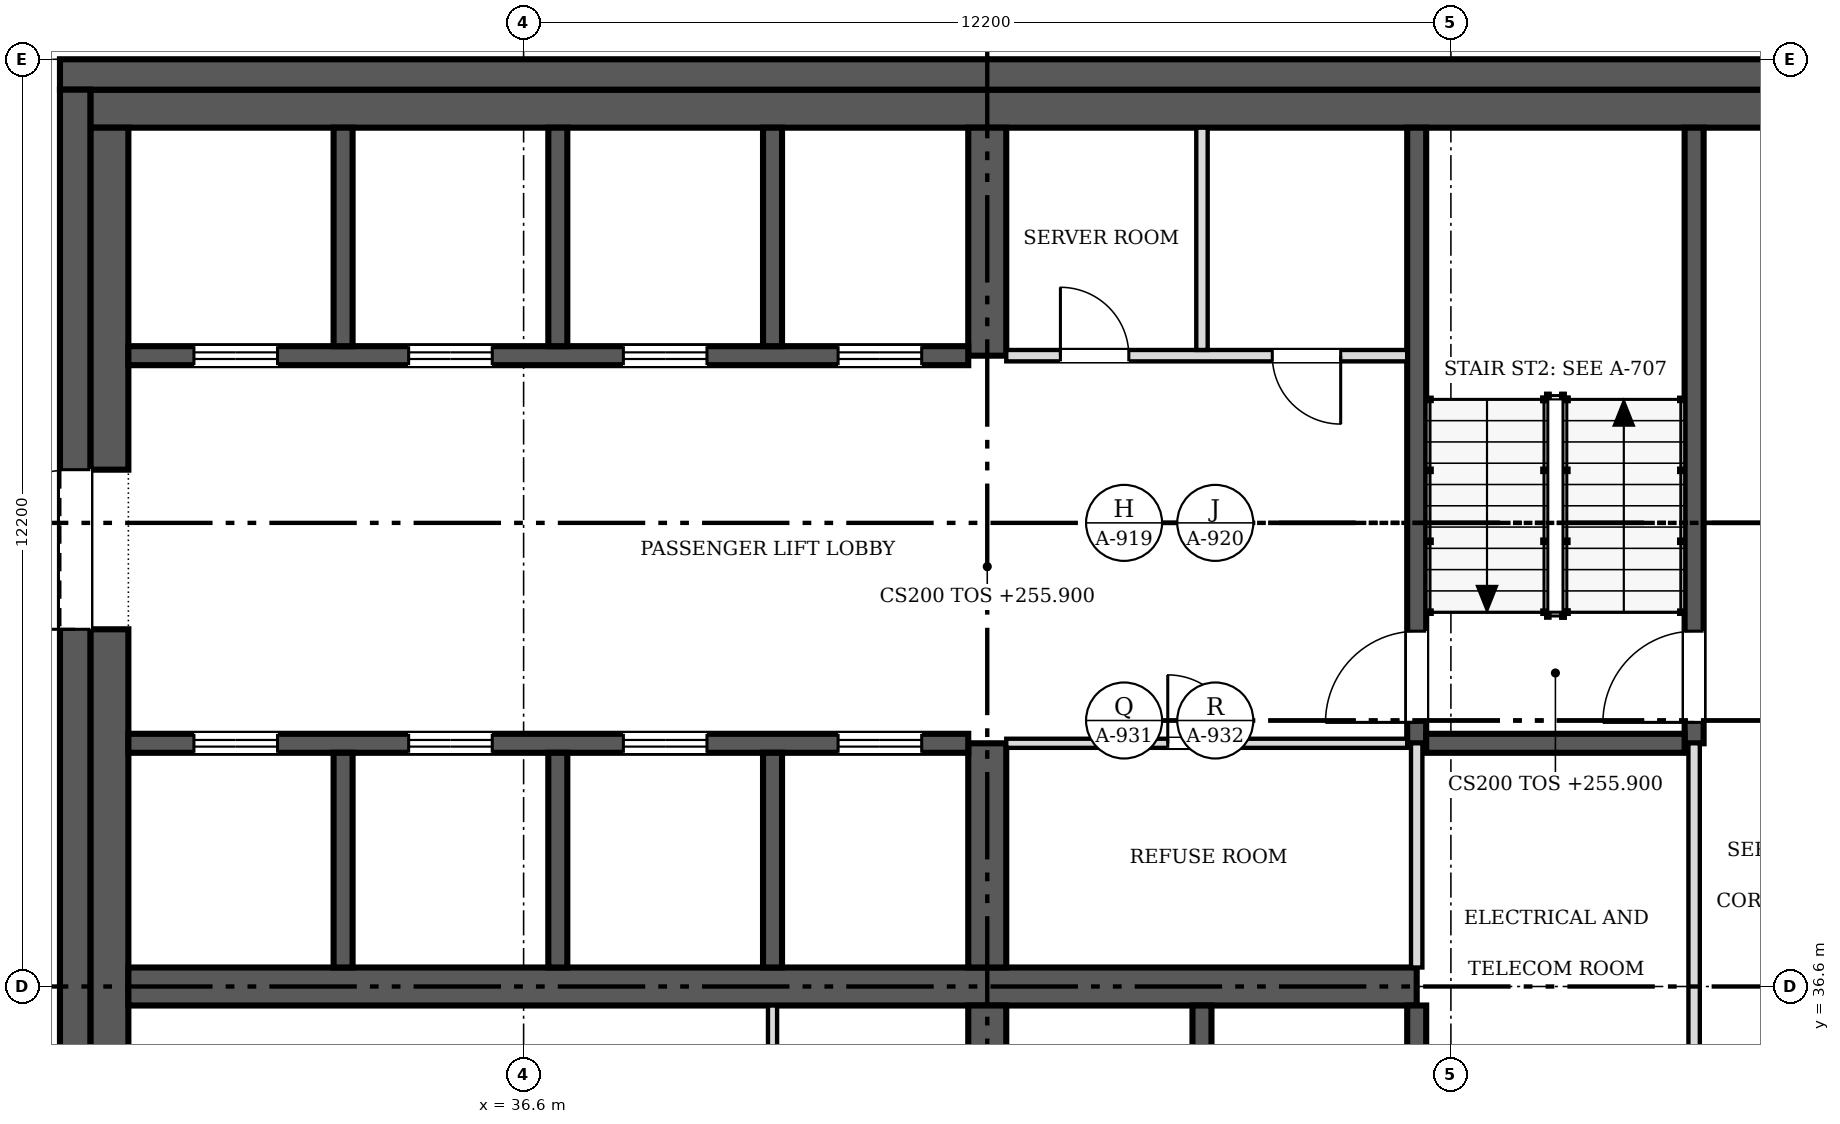
"""IFC4 building model, lengths in metres.
Left out: names, types, materials, properties, quantities, classifications, styles, units other than length and angle.
Written with IfcOpenShell. Run it as: python <this file> out.ifc"""

import sys

from ifc_helpers import new_model, si_unit, direction, frame, frame_2d, origin, place, context, subcontext, project, spatial, rectangle, extrude, source, transform, mapped, element, fill, save


model = new_model("IFC4")
c1 = context("Model", 3, precision=1e-05, world=origin(), true_north=direction((0.0, 1.0)))
c2 = subcontext(c1, "Body", "Model", "MODEL_VIEW")
j1 = project(units=[si_unit("LENGTHUNIT", "METRE"), si_unit("PLANEANGLEUNIT", "RADIAN")], contexts=[c1])
p1 = place(None, origin())
s1 = spatial("IfcSite", under=j1, at=p1, CompositionType="ELEMENT")
p2 = place(p1, origin())
s2 = spatial("IfcBuilding", under=s1, at=p2, CompositionType="ELEMENT")
p3 = place(p2, frame((0.0, 0.0, 255.9)))
s3 = spatial("IfcBuildingStorey", under=s2, at=p3, CompositionType="ELEMENT", Elevation=255.9)
p4 = place(p3, frame((30.7, 24.8, 0.0), z_axis=(0.0, 0.0, 1.0), x_axis=(0.0, 1.0, 0.0)))
e1 = element("IfcWall", 1, at=p4, inside=s3, PredefinedType="SHEAR", context=c2, shape_type="SweptSolid", body=[
    extrude(rectangle(XDim=23.6, YDim=0.4, at=frame_2d((11.8, 0.0))), origin(), (0.0, 0.0, 1.0), 3.8),
])
m1 = source(origin(), c2, "Body", "SweptSolid", [
    extrude(rectangle(XDim=2.1, YDim=2.4, at=frame_2d((1.05, 1.2))), frame((0.0, 0.21, 0.0), z_axis=(0.0, -1.0, 0.0), x_axis=(1.0, 0.0, 0.0)), (0.0, 0.0, 1.0), 0.42),
])
p5 = place(p4, frame((5.0, 0.0, 0.0)))
e2 = element("IfcOpeningElement", 2, at=p5, cuts=e1, PredefinedType="OPENING", context=c2, shape_type="MappedRepresentation", body=[
    mapped(m1, transform((0.0, 0.0, 0.0), scale=1.0)),
])
p6 = place(p4, frame((16.5, 0.0, 0.0)))
e3 = element("IfcOpeningElement", 3, at=p6, cuts=e1, PredefinedType="OPENING", context=c2, shape_type="MappedRepresentation", body=[
    mapped(m1, transform((0.0, 0.0, 0.0), scale=1.0)),
])
p7 = place(p3, frame((30.5, 48.6, 0.0), z_axis=(0.0, 0.0, 1.0), x_axis=(1.0, 0.0, 0.0)))
e4 = element("IfcWall", 4, at=p7, inside=s3, PredefinedType="SHEAR", context=c2, shape_type="SweptSolid", body=[
    extrude(rectangle(XDim=24.4, YDim=0.4, at=frame_2d((12.2, 0.0))), origin(), (0.0, 0.0, 1.0), 3.8),
])
p8 = place(p3, frame((30.9, 48.15, 0.0), z_axis=(0.0, 0.0, 1.0), x_axis=(1.0, 0.0, 0.0)))
e5 = element("IfcWall", 5, at=p8, inside=s3, PredefinedType="SOLIDWALL", context=c2, shape_type="SweptSolid", body=[
    extrude(rectangle(XDim=23.6, YDim=0.5, at=frame_2d((11.8, 0.0))), origin(), (0.0, 0.0, 1.0), 3.8),
])
p9 = place(p3, frame((31.15, 31.9, 0.0), z_axis=(0.0, 0.0, 1.0), x_axis=(0.0, 1.0, 0.0)))
e6 = element("IfcWall", 6, at=p9, inside=s3, PredefinedType="SOLIDWALL", context=c2, shape_type="SweptSolid", body=[
    extrude(rectangle(XDim=9.4, YDim=0.5, at=frame_2d((4.7, 0.0))), origin(), (0.0, 0.0, 1.0), 3.8),
])
p10 = place(p3, frame((31.15, 43.4, 0.0), z_axis=(0.0, 0.0, 1.0), x_axis=(0.0, 1.0, 0.0)))
e7 = element("IfcWall", 7, at=p10, inside=s3, PredefinedType="SOLIDWALL", context=c2, shape_type="SweptSolid", body=[
    extrude(rectangle(XDim=4.5, YDim=0.5, at=frame_2d((2.25, 0.0))), origin(), (0.0, 0.0, 1.0), 3.8),
])
p11 = place(p3, frame((31.4, 36.6, 0.0), z_axis=(0.0, 0.0, 1.0), x_axis=(1.0, 0.0, 0.0)))
e8 = element("IfcWall", 8, at=p11, inside=s3, PredefinedType="SHEAR", context=c2, shape_type="SweptSolid", body=[
    extrude(rectangle(XDim=16.95, YDim=0.5, at=frame_2d((8.475, 0.0))), origin(), (0.0, 0.0, 1.0), 3.8),
])
p12 = place(p3, frame((42.7, 36.35, 0.0), z_axis=(0.0, 0.0, 1.0), x_axis=(0.0, -1.0, 0.0)))
e9 = element("IfcWall", 9, at=p12, inside=s3, PredefinedType="SHEAR", context=c2, shape_type="SweptSolid", body=[
    extrude(rectangle(XDim=11.05, YDim=0.5, at=frame_2d((5.525, 0.0))), origin(), (0.0, 0.0, 1.0), 3.8),
])
m2 = source(origin(), c2, "Body", "SweptSolid", [
    extrude(rectangle(XDim=0.9, YDim=2.1, at=frame_2d((0.45, 1.05))), frame((0.0, 0.26, 0.0), z_axis=(0.0, -1.0, 0.0), x_axis=(1.0, 0.0, 0.0)), (0.0, 0.0, 1.0), 0.52),
])
p13 = place(p12, frame((6.5, 0.0, 0.0)))
e10 = element("IfcOpeningElement", 10, at=p13, cuts=e9, PredefinedType="OPENING", context=c2, shape_type="MappedRepresentation", body=[
    mapped(m2, transform((0.0, 0.0, 0.0), scale=1.0)),
])
m3 = source(origin(), c2, "Body", "SweptSolid", [
    extrude(rectangle(XDim=1.1, YDim=2.1, at=frame_2d((0.55, 1.05))), frame((0.0, 0.26, 0.0), z_axis=(0.0, -1.0, 0.0), x_axis=(1.0, 0.0, 0.0)), (0.0, 0.0, 1.0), 0.52),
])
p14 = place(p12, frame((3.8, 0.0, 0.0)))
e11 = element("IfcOpeningElement", 11, at=p14, cuts=e9, PredefinedType="OPENING", context=c2, shape_type="MappedRepresentation", body=[
    mapped(m3, transform((0.0, 0.0, 0.0), scale=1.0)),
])
p15 = place(p3, frame((42.7, 36.85, 0.0), z_axis=(0.0, 0.0, 1.0), x_axis=(0.0, 1.0, 0.0)))
e12 = element("IfcWall", 12, at=p15, inside=s3, PredefinedType="SHEAR", context=c2, shape_type="SweptSolid", body=[
    extrude(rectangle(XDim=2.95, YDim=0.5, at=frame_2d((1.475, 0.0))), origin(), (0.0, 0.0, 1.0), 3.8),
])
p16 = place(p3, frame((42.7, 44.9, 0.0), z_axis=(0.0, 0.0, 1.0), x_axis=(0.0, 1.0, 0.0)))
e13 = element("IfcWall", 13, at=p16, inside=s3, PredefinedType="SHEAR", context=c2, shape_type="SweptSolid", body=[
    extrude(rectangle(XDim=3.0, YDim=0.5, at=frame_2d((1.5, 0.0))), origin(), (0.0, 0.0, 1.0), 3.8),
])
p17 = place(p3, frame((31.4, 39.8, 0.0), z_axis=(0.0, 0.0, 1.0), x_axis=(1.0, 0.0, 0.0)))
e14 = element("IfcWall", 14, at=p17, inside=s3, PredefinedType="SOLIDWALL", context=c2, shape_type="SweptSolid", body=[
    extrude(rectangle(XDim=11.05, YDim=0.25, at=frame_2d((5.525, 0.0))), origin(), (0.0, 0.0, 1.0), 3.8),
])
m4 = source(origin(), c2, "Body", "SweptSolid", [
    extrude(rectangle(XDim=1.1, YDim=2.1, at=frame_2d((0.55, 1.05))), frame((0.0, 0.135, 0.0), z_axis=(0.0, -1.0, 0.0), x_axis=(1.0, 0.0, 0.0)), (0.0, 0.0, 1.0), 0.27),
])
p18 = place(p17, frame((0.863, 0.0, 0.0)))
e15 = element("IfcOpeningElement", 15, at=p18, cuts=e14, PredefinedType="OPENING", context=c2, shape_type="MappedRepresentation", body=[
    mapped(m4, transform((0.0, 0.0, 0.0), scale=1.0)),
])
p19 = place(p17, frame((3.688, 0.0, 0.0)))
e16 = element("IfcOpeningElement", 16, at=p19, cuts=e14, PredefinedType="OPENING", context=c2, shape_type="MappedRepresentation", body=[
    mapped(m4, transform((0.0, 0.0, 0.0), scale=1.0)),
])
p20 = place(p17, frame((6.512, 0.0, 0.0)))
e17 = element("IfcOpeningElement", 17, at=p20, cuts=e14, PredefinedType="OPENING", context=c2, shape_type="MappedRepresentation", body=[
    mapped(m4, transform((0.0, 0.0, 0.0), scale=1.0)),
])
p21 = place(p17, frame((9.337, 0.0, 0.0)))
e18 = element("IfcOpeningElement", 18, at=p21, cuts=e14, PredefinedType="OPENING", context=c2, shape_type="MappedRepresentation", body=[
    mapped(m4, transform((0.0, 0.0, 0.0), scale=1.0)),
])
p22 = place(p3, frame((42.45, 44.9, 0.0), z_axis=(0.0, 0.0, 1.0), x_axis=(-1.0, 0.0, 0.0)))
e19 = element("IfcWall", 19, at=p22, inside=s3, PredefinedType="SOLIDWALL", context=c2, shape_type="SweptSolid", body=[
    extrude(rectangle(XDim=11.05, YDim=0.25, at=frame_2d((5.525, 0.0))), origin(), (0.0, 0.0, 1.0), 3.8),
])
p23 = place(p22, frame((9.087, 0.0, 0.0)))
e20 = element("IfcOpeningElement", 20, at=p23, cuts=e19, PredefinedType="OPENING", context=c2, shape_type="MappedRepresentation", body=[
    mapped(m4, transform((0.0, 0.0, 0.0), scale=1.0)),
])
p24 = place(p22, frame((6.262, 0.0, 0.0)))
e21 = element("IfcOpeningElement", 21, at=p24, cuts=e19, PredefinedType="OPENING", context=c2, shape_type="MappedRepresentation", body=[
    mapped(m4, transform((0.0, 0.0, 0.0), scale=1.0)),
])
p25 = place(p22, frame((3.438, 0.0, 0.0)))
e22 = element("IfcOpeningElement", 22, at=p25, cuts=e19, PredefinedType="OPENING", context=c2, shape_type="MappedRepresentation", body=[
    mapped(m4, transform((0.0, 0.0, 0.0), scale=1.0)),
])
p26 = place(p22, frame((0.613, 0.0, 0.0)))
e23 = element("IfcOpeningElement", 23, at=p26, cuts=e19, PredefinedType="OPENING", context=c2, shape_type="MappedRepresentation", body=[
    mapped(m4, transform((0.0, 0.0, 0.0), scale=1.0)),
])
p27 = place(p3, frame((48.35, 36.35, 0.0), z_axis=(0.0, 0.0, 1.0), x_axis=(0.0, -1.0, 0.0)))
e24 = element("IfcWall", 24, at=p27, inside=s3, PredefinedType="SOLIDWALL", context=c2, shape_type="SweptSolid", body=[
    extrude(rectangle(XDim=11.05, YDim=0.25, at=frame_2d((5.525, 0.0))), origin(), (0.0, 0.0, 1.0), 3.8),
])
m5 = source(origin(), c2, "Body", "SweptSolid", [
    extrude(rectangle(XDim=1.2, YDim=2.1, at=frame_2d((0.6, 1.05))), frame((0.0, 0.135, 0.0), z_axis=(0.0, -1.0, 0.0), x_axis=(1.0, 0.0, 0.0)), (0.0, 0.0, 1.0), 0.27),
])
p28 = place(p27, frame((3.225, 0.0, 0.0)))
e25 = element("IfcOpeningElement", 25, at=p28, cuts=e24, PredefinedType="OPENING", context=c2, shape_type="MappedRepresentation", body=[
    mapped(m5, transform((0.0, 0.0, 0.0), scale=1.0)),
])
p29 = place(p3, frame((48.35, 47.9, 0.0), z_axis=(0.0, 0.0, 1.0), x_axis=(0.0, -1.0, 0.0)))
e26 = element("IfcWall", 26, at=p29, inside=s3, PredefinedType="SOLIDWALL", context=c2, shape_type="SweptSolid", body=[
    extrude(rectangle(XDim=8.1, YDim=0.25, at=frame_2d((4.05, 0.0))), origin(), (0.0, 0.0, 1.0), 3.8),
])
p30 = place(p29, frame((6.625, 0.0, 0.0)))
e27 = element("IfcOpeningElement", 27, at=p30, cuts=e26, PredefinedType="OPENING", context=c2, shape_type="MappedRepresentation", body=[
    mapped(m5, transform((0.0, 0.0, 0.0), scale=1.0)),
])
p31 = place(p3, frame((52.0, 39.8, 0.0), z_axis=(0.0, 0.0, 1.0), x_axis=(0.0, 1.0, 0.0)))
e28 = element("IfcWall", 28, at=p31, inside=s3, PredefinedType="SOLIDWALL", context=c2, shape_type="SweptSolid", body=[
    extrude(rectangle(XDim=8.1, YDim=0.25, at=frame_2d((4.05, 0.0))), origin(), (0.0, 0.0, 1.0), 3.8),
])
p32 = place(p31, frame((0.275, 0.0, 0.0)))
e29 = element("IfcOpeningElement", 29, at=p32, cuts=e28, PredefinedType="OPENING", context=c2, shape_type="MappedRepresentation", body=[
    mapped(m5, transform((0.0, 0.0, 0.0), scale=1.0)),
])
p33 = place(p3, frame((48.475, 39.8, 0.0), z_axis=(0.0, 0.0, 1.0), x_axis=(1.0, 0.0, 0.0)))
e30 = element("IfcWall", 30, at=p33, inside=s3, PredefinedType="SOLIDWALL", context=c2, shape_type="SweptSolid", body=[
    extrude(rectangle(XDim=3.4, YDim=0.25, at=frame_2d((1.7, 0.0))), origin(), (0.0, 0.0, 1.0), 3.8),
])
for number, where, z_axis, x_axis in (
    (31, (34.225, 36.85, 0.0), (0.0, 0.0, 1.0), (0.0, 1.0, 0.0)),
    (32, (37.05, 36.85, 0.0), (0.0, 0.0, 1.0), (0.0, 1.0, 0.0)),
    (33, (39.875, 36.85, 0.0), (0.0, 0.0, 1.0), (0.0, 1.0, 0.0)),
):
    element("IfcWall", number, at=place(p3, frame(where, z_axis=z_axis, x_axis=x_axis)), inside=s3, PredefinedType="SOLIDWALL", context=c2, shape_type="SweptSolid", body=[
        extrude(rectangle(XDim=2.825, YDim=0.25, at=frame_2d((1.413, 0.0))), origin(), (0.0, 0.0, 1.0), 3.8),
    ])
p34 = place(p3, frame((45.525, 33.525, 0.0), z_axis=(0.0, 0.0, 1.0), x_axis=(0.0, 1.0, 0.0)))
e34 = element("IfcWall", 34, at=p34, inside=s3, PredefinedType="SOLIDWALL", context=c2, shape_type="SweptSolid", body=[
    extrude(rectangle(XDim=2.825, YDim=0.25, at=frame_2d((1.413, 0.0))), origin(), (0.0, 0.0, 1.0), 3.8),
])
for number, where, z_axis, x_axis in (
    (35, (34.225, 45.025, 0.0), (0.0, 0.0, 1.0), (0.0, 1.0, 0.0)),
    (36, (37.05, 45.025, 0.0), (0.0, 0.0, 1.0), (0.0, 1.0, 0.0)),
    (37, (39.875, 45.025, 0.0), (0.0, 0.0, 1.0), (0.0, 1.0, 0.0)),
):
    element("IfcWall", number, at=place(p3, frame(where, z_axis=z_axis, x_axis=x_axis)), inside=s3, PredefinedType="SOLIDWALL", context=c2, shape_type="SweptSolid", body=[
        extrude(rectangle(XDim=2.875, YDim=0.25, at=frame_2d((1.438, 0.0))), origin(), (0.0, 0.0, 1.0), 3.8),
    ])
p35 = place(p3, frame((52.0, 33.525, 0.0), z_axis=(0.0, 0.0, 1.0), x_axis=(0.0, 1.0, 0.0)))
e38 = element("IfcWall", 38, at=p35, inside=s3, PredefinedType="PARTITIONING", context=c2, shape_type="SweptSolid", body=[
    extrude(rectangle(XDim=6.275, YDim=0.15, at=frame_2d((3.138, 0.0))), origin(), (0.0, 0.0, 1.0), 3.55),
])
m6 = source(origin(), c2, "Body", "SweptSolid", [
    extrude(rectangle(XDim=0.9, YDim=2.1, at=frame_2d((0.45, 1.05))), frame((0.0, 0.085, 0.0), z_axis=(0.0, -1.0, 0.0), x_axis=(1.0, 0.0, 0.0)), (0.0, 0.0, 1.0), 0.17),
])
p36 = place(p35, frame((1.025, 0.0, 0.0)))
e39 = element("IfcOpeningElement", 39, at=p36, cuts=e38, PredefinedType="OPENING", context=c2, shape_type="MappedRepresentation", body=[
    mapped(m6, transform((0.0, 0.0, 0.0), scale=1.0)),
])
p37 = place(p3, frame((48.225, 39.8, 0.0), z_axis=(0.0, 0.0, 1.0), x_axis=(-1.0, 0.0, 0.0)))
e40 = element("IfcWall", 40, at=p37, inside=s3, PredefinedType="PARTITIONING", context=c2, shape_type="SweptSolid", body=[
    extrude(rectangle(XDim=5.275, YDim=0.12, at=frame_2d((2.638, 0.0))), origin(), (0.0, 0.0, 1.0), 3.55),
])
m7 = source(origin(), c2, "Body", "SweptSolid", [
    extrude(rectangle(XDim=0.9, YDim=2.1, at=frame_2d((0.45, 1.05))), frame((0.0, 0.07, 0.0), z_axis=(0.0, -1.0, 0.0), x_axis=(1.0, 0.0, 0.0)), (0.0, 0.0, 1.0), 0.14),
])
p38 = place(p37, frame((2.25, 0.0, 0.0)))
e41 = element("IfcOpeningElement", 41, at=p38, cuts=e40, PredefinedType="OPENING", context=c2, shape_type="MappedRepresentation", body=[
    mapped(m7, transform((0.0, 0.0, 0.0), scale=1.0)),
])
p39 = place(p3, frame((42.95, 44.9, 0.0), z_axis=(0.0, 0.0, 1.0), x_axis=(1.0, 0.0, 0.0)))
e42 = element("IfcWall", 42, at=p39, inside=s3, PredefinedType="PARTITIONING", context=c2, shape_type="SweptSolid", body=[
    extrude(rectangle(XDim=5.275, YDim=0.15, at=frame_2d((2.638, 0.0))), origin(), (0.0, 0.0, 1.0), 3.55),
])
p40 = place(p39, frame((0.712, 0.0, 0.0)))
e43 = element("IfcOpeningElement", 43, at=p40, cuts=e42, PredefinedType="OPENING", context=c2, shape_type="MappedRepresentation", body=[
    mapped(m6, transform((0.0, 0.0, 0.0), scale=1.0)),
])
p41 = place(p39, frame((3.5, 0.0, 0.0)))
e44 = element("IfcOpeningElement", 44, at=p41, cuts=e42, PredefinedType="OPENING", context=c2, shape_type="MappedRepresentation", body=[
    mapped(m6, transform((0.0, 0.0, 0.0), scale=1.0)),
])
p42 = place(p3, frame((48.35, 36.85, 0.0), z_axis=(0.0, 0.0, 1.0), x_axis=(0.0, 1.0, 0.0)))
e45 = element("IfcWall", 45, at=p42, inside=s3, PredefinedType="PARTITIONING", context=c2, shape_type="SweptSolid", body=[
    extrude(rectangle(XDim=2.95, YDim=0.15, at=frame_2d((1.475, 0.0))), origin(), (0.0, 0.0, 1.0), 3.55),
])
p43 = place(p3, frame((39.875, 33.46, 0.0), z_axis=(0.0, 0.0, 1.0), x_axis=(0.0, 1.0, 0.0)))
e46 = element("IfcWall", 46, at=p43, inside=s3, PredefinedType="PARTITIONING", context=c2, shape_type="SweptSolid", body=[
    extrude(rectangle(XDim=2.89, YDim=0.12, at=frame_2d((1.445, 0.0))), origin(), (0.0, 0.0, 1.0), 3.55),
])
p44 = place(p3, frame((45.525, 44.975, 0.0), z_axis=(0.0, 0.0, 1.0), x_axis=(0.0, 1.0, 0.0)))
e47 = element("IfcWall", 47, at=p44, inside=s3, PredefinedType="PARTITIONING", context=c2, shape_type="SweptSolid", body=[
    extrude(rectangle(XDim=2.925, YDim=0.15, at=frame_2d((1.462, 0.0))), origin(), (0.0, 0.0, 1.0), 3.55),
])
m8 = source(origin(), c2, "Body", "SweptSolid", [
    extrude(rectangle(XDim=2.1, YDim=2.4, at=frame_2d((1.05, 1.2))), frame((0.0, 0.025, 0.0), z_axis=(0.0, -1.0, 0.0), x_axis=(1.0, 0.0, 0.0)), (0.0, 0.0, 1.0), 0.05),
])
p45 = place(p6, origin())
e48 = element("IfcDoor", 48, at=p45, inside=s3, OperationType="DOUBLE_DOOR_SINGLE_SWING", PredefinedType="DOOR", context=c2, shape_type="MappedRepresentation", body=[
    mapped(m8, transform((0.0, 0.0, 0.0), scale=1.0)),
])
fill(e3, e48)
m9 = source(origin(), c2, "Body", "SweptSolid", [
    extrude(rectangle(XDim=1.1, YDim=2.1, at=frame_2d((0.55, 1.05))), frame((0.0, 0.025, 0.0), z_axis=(0.0, -1.0, 0.0), x_axis=(1.0, 0.0, 0.0)), (0.0, 0.0, 1.0), 0.05),
])
p46 = place(p18, origin())
e49 = element("IfcDoor", 49, at=p46, inside=s3, OperationType="DOUBLE_DOOR_SLIDING", PredefinedType="DOOR", context=c2, shape_type="MappedRepresentation", body=[
    mapped(m9, transform((0.0, 0.0, 0.0), scale=1.0)),
])
fill(e15, e49)
p47 = place(p19, origin())
e50 = element("IfcDoor", 50, at=p47, inside=s3, OperationType="DOUBLE_DOOR_SLIDING", PredefinedType="DOOR", context=c2, shape_type="MappedRepresentation", body=[
    mapped(m9, transform((0.0, 0.0, 0.0), scale=1.0)),
])
fill(e16, e50)
p48 = place(p20, origin())
e51 = element("IfcDoor", 51, at=p48, inside=s3, OperationType="DOUBLE_DOOR_SLIDING", PredefinedType="DOOR", context=c2, shape_type="MappedRepresentation", body=[
    mapped(m9, transform((0.0, 0.0, 0.0), scale=1.0)),
])
fill(e17, e51)
p49 = place(p21, origin())
e52 = element("IfcDoor", 52, at=p49, inside=s3, OperationType="DOUBLE_DOOR_SLIDING", PredefinedType="DOOR", context=c2, shape_type="MappedRepresentation", body=[
    mapped(m9, transform((0.0, 0.0, 0.0), scale=1.0)),
])
fill(e18, e52)
p50 = place(p23, origin())
e53 = element("IfcDoor", 53, at=p50, inside=s3, OperationType="DOUBLE_DOOR_SLIDING", PredefinedType="DOOR", context=c2, shape_type="MappedRepresentation", body=[
    mapped(m9, transform((0.0, 0.0, 0.0), scale=1.0)),
])
fill(e20, e53)
p51 = place(p24, origin())
e54 = element("IfcDoor", 54, at=p51, inside=s3, OperationType="DOUBLE_DOOR_SLIDING", PredefinedType="DOOR", context=c2, shape_type="MappedRepresentation", body=[
    mapped(m9, transform((0.0, 0.0, 0.0), scale=1.0)),
])
fill(e21, e54)
p52 = place(p25, origin())
e55 = element("IfcDoor", 55, at=p52, inside=s3, OperationType="DOUBLE_DOOR_SLIDING", PredefinedType="DOOR", context=c2, shape_type="MappedRepresentation", body=[
    mapped(m9, transform((0.0, 0.0, 0.0), scale=1.0)),
])
fill(e22, e55)
p53 = place(p26, origin())
e56 = element("IfcDoor", 56, at=p53, inside=s3, OperationType="DOUBLE_DOOR_SLIDING", PredefinedType="DOOR", context=c2, shape_type="MappedRepresentation", body=[
    mapped(m9, transform((0.0, 0.0, 0.0), scale=1.0)),
])
fill(e23, e56)
m10 = source(origin(), c2, "Body", "SweptSolid", [
    extrude(rectangle(XDim=1.2, YDim=2.1, at=frame_2d((0.6, 1.05))), frame((0.0, 0.025, 0.0), z_axis=(0.0, -1.0, 0.0), x_axis=(1.0, 0.0, 0.0)), (0.0, 0.0, 1.0), 0.05),
])
p54 = place(p30, origin())
e57 = element("IfcDoor", 57, at=p54, inside=s3, OperationType="SINGLE_SWING_RIGHT", PredefinedType="DOOR", context=c2, shape_type="MappedRepresentation", body=[
    mapped(m10, transform((0.0, 0.0, 0.0), scale=1.0)),
])
fill(e27, e57)
p55 = place(p32, origin())
e58 = element("IfcDoor", 58, at=p55, inside=s3, OperationType="SINGLE_SWING_LEFT", PredefinedType="DOOR", context=c2, shape_type="MappedRepresentation", body=[
    mapped(m10, transform((0.0, 0.0, 0.0), scale=1.0)),
])
fill(e29, e58)
m11 = source(origin(), c2, "Body", "SweptSolid", [
    extrude(rectangle(XDim=0.9, YDim=2.1, at=frame_2d((0.45, 1.05))), frame((0.0, 0.025, 0.0), z_axis=(0.0, -1.0, 0.0), x_axis=(1.0, 0.0, 0.0)), (0.0, 0.0, 1.0), 0.05),
])
p56 = place(p38, origin())
e59 = element("IfcDoor", 59, at=p56, inside=s3, OperationType="SINGLE_SWING_RIGHT", PredefinedType="DOOR", context=c2, shape_type="MappedRepresentation", body=[
    mapped(m11, transform((0.0, 0.0, 0.0), scale=1.0)),
])
fill(e41, e59)
p57 = place(p40, origin())
e60 = element("IfcDoor", 60, at=p57, inside=s3, OperationType="SINGLE_SWING_LEFT", PredefinedType="DOOR", context=c2, shape_type="MappedRepresentation", body=[
    mapped(m11, transform((0.0, 0.0, 0.0), scale=1.0)),
])
fill(e43, e60)
p58 = place(p41, origin())
e61 = element("IfcDoor", 61, at=p58, inside=s3, OperationType="SINGLE_SWING_RIGHT", PredefinedType="DOOR", context=c2, shape_type="MappedRepresentation", body=[
    mapped(m11, transform((0.0, 0.0, 0.0), scale=1.0)),
])
fill(e44, e61)
save(model, sys.argv[1])
